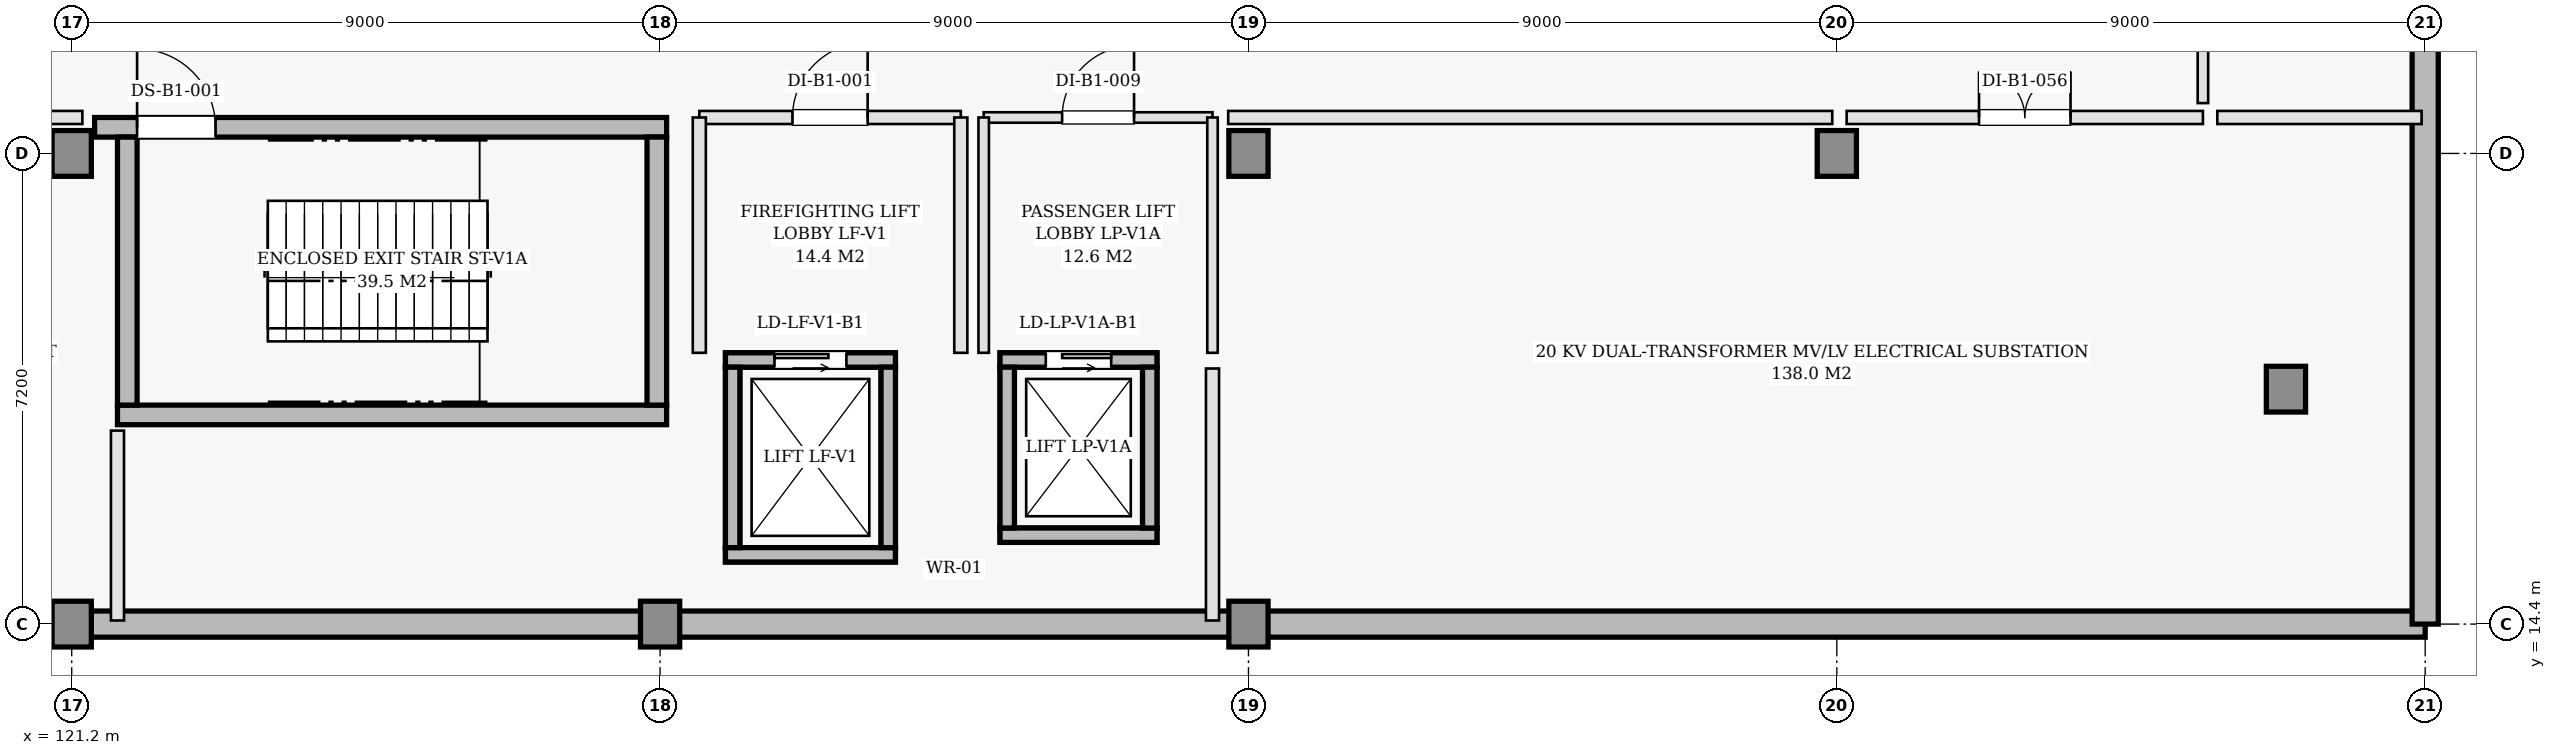
"""IFC4 building model, lengths in metres.
Left out: names, types, materials, properties, quantities, classifications, styles, units other than length and angle.
Written with IfcOpenShell. Run it as: python <this file> out.ifc"""

import sys

from ifc_helpers import new_model, si_unit, direction, frame, frame_2d, origin, origin_2d, place, context, subcontext, project, spatial, rectangle, extrude, element, fill, save


model = new_model("IFC4")
c1 = context("Model", 3, precision=1e-05, world=origin(), true_north=direction((0.0, 1.0)))
c2 = subcontext(c1, "Body", "Model", "MODEL_VIEW")
j1 = project(units=[si_unit("LENGTHUNIT", "METRE"), si_unit("PLANEANGLEUNIT", "RADIAN")], contexts=[c1])
p1 = place(None, origin())
s1 = spatial("IfcSite", under=j1, at=p1, CompositionType="ELEMENT")
p2 = place(p1, origin())
s2 = spatial("IfcBuilding", under=s1, at=p2, CompositionType="ELEMENT")
p3 = place(p2, frame((0.0, 0.0, -4.5)))
s3 = spatial("IfcBuildingStorey", under=s2, at=p3, CompositionType="ELEMENT", Elevation=-4.5)
for number, where, z_axis, x_axis in (
    (1, (121.2, 14.4, 0.0), (0.0, 0.0, 1.0), (1.0, 0.0, 0.0)),
    (2, (121.2, 21.6, 0.0), (0.0, 0.0, 1.0), (1.0, 0.0, 0.0)),
    (3, (130.2, 14.4, 0.0), (0.0, 0.0, 1.0), (1.0, 0.0, 0.0)),
    (4, (139.2, 14.4, 0.0), (0.0, 0.0, 1.0), (1.0, 0.0, 0.0)),
    (5, (139.2, 21.6, 0.0), (0.0, 0.0, 1.0), (1.0, 0.0, 0.0)),
    (6, (148.2, 21.6, 0.0), (0.0, 0.0, 1.0), (1.0, 0.0, 0.0)),
):
    element("IfcColumn", number, at=place(p3, frame(where, z_axis=z_axis, x_axis=x_axis)), inside=s3, PredefinedType="COLUMN", context=c2, shape_type="SweptSolid", body=[
        extrude(rectangle(XDim=0.7, YDim=0.7, at=origin_2d()), origin(), (0.0, 0.0, 1.0), 4.5),
    ])
p4 = place(p3, frame((155.07, 17.994, 0.0), z_axis=(0.0, 0.0, 1.0), x_axis=(1.0, 0.0, 0.0)))
e7 = element("IfcColumn", 7, at=p4, inside=s3, PredefinedType="PILASTER", context=c2, shape_type="SweptSolid", body=[
    extrude(rectangle(XDim=0.7, YDim=0.7, at=origin_2d()), origin(), (0.0, 0.0, 1.0), 4.5),
])
p5 = place(p3, frame((112.2, 14.4, 0.0), z_axis=(0.0, 0.0, 1.0), x_axis=(1.0, 0.0, 0.0)))
e8 = element("IfcWall", 8, at=p5, inside=s3, PredefinedType="USERDEFINED", context=c2, shape_type="SweptSolid", body=[
    extrude(rectangle(XDim=45.0, YDim=0.4, at=frame_2d((22.5, 0.0))), origin(), (0.0, 0.0, 1.0), 4.15),
])
p6 = place(p3, frame((157.2, 14.4, 0.0), z_axis=(0.0, 0.0, 1.0), x_axis=(0.0, 1.0, 0.0)))
e9 = element("IfcWall", 9, at=p6, inside=s3, PredefinedType="USERDEFINED", context=c2, shape_type="SweptSolid", body=[
    extrude(rectangle(XDim=21.6, YDim=0.4, at=frame_2d((10.8, 0.0))), origin(), (0.0, 0.0, 1.0), 4.15),
])
p7 = place(p3, frame((121.9, 17.6, 0.0), z_axis=(0.0, 0.0, 1.0), x_axis=(1.0, 0.0, 0.0)))
e10 = element("IfcWall", 10, at=p7, inside=s3, PredefinedType="SHEAR", context=c2, shape_type="SweptSolid", body=[
    extrude(rectangle(XDim=8.4, YDim=0.3, at=frame_2d((4.2, 0.0))), origin(), (0.0, 0.0, 1.0), 4.15),
])
p8 = place(p3, frame((121.55, 22.0, 0.0), z_axis=(0.0, 0.0, 1.0), x_axis=(1.0, 0.0, 0.0)))
e11 = element("IfcWall", 11, at=p8, inside=s3, PredefinedType="SHEAR", context=c2, shape_type="SweptSolid", body=[
    extrude(rectangle(XDim=8.75, YDim=0.3, at=frame_2d((4.375, 0.0))), origin(), (0.0, 0.0, 1.0), 4.15),
])
p9 = place(p8, frame((0.65, 0.0, 0.0)))
e12 = element("IfcOpeningElement", 12, at=p9, cuts=e11, PredefinedType="OPENING", context=c2, shape_type="SweptSolid", body=[
    extrude(rectangle(XDim=1.2, YDim=2.15, at=frame_2d((0.6, 1.075))), frame((0.0, 0.16, 0.0), z_axis=(0.0, -1.0, 0.0), x_axis=(1.0, 0.0, 0.0)), (0.0, 0.0, 1.0), 0.32),
])
for number, where, z_axis, x_axis in (
    (13, (122.05, 17.75, 0.0), (0.0, 0.0, 1.0), (0.0, 1.0, 0.0)),
    (14, (130.15, 17.75, 0.0), (0.0, 0.0, 1.0), (0.0, 1.0, 0.0)),
):
    element("IfcWall", number, at=place(p3, frame(where, z_axis=z_axis, x_axis=x_axis)), inside=s3, PredefinedType="SHEAR", context=c2, shape_type="SweptSolid", body=[
        extrude(rectangle(XDim=4.1, YDim=0.3, at=frame_2d((2.05, 0.0))), origin(), (0.0, 0.0, 1.0), 4.15),
    ])
for number, where, z_axis, x_axis in (
    (15, (131.2, 15.46, -1.4), (0.0, 0.0, 1.0), (1.0, 0.0, 0.0)),
    (16, (131.2, 18.44, -1.4), (0.0, 0.0, 1.0), (1.0, 0.0, 0.0)),
):
    element("IfcWall", number, at=place(p3, frame(where, z_axis=z_axis, x_axis=x_axis)), inside=s3, PredefinedType="SHEAR", context=c2, shape_type="SweptSolid", body=[
        extrude(rectangle(XDim=2.6, YDim=0.22, at=frame_2d((1.3, 0.0))), origin(), (0.0, 0.0, 1.0), 0.9),
    ])
for number, where, z_axis, x_axis in (
    (17, (131.31, 15.57, -1.4), (0.0, 0.0, 1.0), (0.0, 1.0, 0.0)),
    (18, (133.69, 15.57, -1.4), (0.0, 0.0, 1.0), (0.0, 1.0, 0.0)),
):
    element("IfcWall", number, at=place(p3, frame(where, z_axis=z_axis, x_axis=x_axis)), inside=s3, PredefinedType="SHEAR", context=c2, shape_type="SweptSolid", body=[
        extrude(rectangle(XDim=2.76, YDim=0.22, at=frame_2d((1.38, 0.0))), origin(), (0.0, 0.0, 1.0), 0.9),
    ])
p10 = place(p3, frame((131.2, 15.46, 0.0), z_axis=(0.0, 0.0, 1.0), x_axis=(1.0, 0.0, 0.0)))
e19 = element("IfcWall", 19, at=p10, inside=s3, PredefinedType="SHEAR", context=c2, shape_type="SweptSolid", body=[
    extrude(rectangle(XDim=2.6, YDim=0.22, at=frame_2d((1.3, 0.0))), origin(), (0.0, 0.0, 1.0), 4.15),
])
p11 = place(p3, frame((131.2, 18.44, 0.0), z_axis=(0.0, 0.0, 1.0), x_axis=(1.0, 0.0, 0.0)))
e20 = element("IfcWall", 20, at=p11, inside=s3, PredefinedType="SHEAR", context=c2, shape_type="SweptSolid", body=[
    extrude(rectangle(XDim=2.6, YDim=0.22, at=frame_2d((1.3, 0.0))), origin(), (0.0, 0.0, 1.0), 4.15),
])
p12 = place(p11, frame((0.75, 0.0, 0.0)))
e21 = element("IfcOpeningElement", 21, at=p12, cuts=e20, PredefinedType="OPENING", context=c2, shape_type="SweptSolid", body=[
    extrude(rectangle(XDim=1.1, YDim=2.15, at=frame_2d((0.55, 1.075))), frame((0.0, 0.12, 0.0), z_axis=(0.0, -1.0, 0.0), x_axis=(1.0, 0.0, 0.0)), (0.0, 0.0, 1.0), 0.24),
])
for number, where, z_axis, x_axis in (
    (22, (131.31, 15.57, 0.0), (0.0, 0.0, 1.0), (0.0, 1.0, 0.0)),
    (23, (133.69, 15.57, 0.0), (0.0, 0.0, 1.0), (0.0, 1.0, 0.0)),
):
    element("IfcWall", number, at=place(p3, frame(where, z_axis=z_axis, x_axis=x_axis)), inside=s3, PredefinedType="SHEAR", context=c2, shape_type="SweptSolid", body=[
        extrude(rectangle(XDim=2.76, YDim=0.22, at=frame_2d((1.38, 0.0))), origin(), (0.0, 0.0, 1.0), 4.15),
    ])
p13 = place(p3, frame((130.8, 22.15, 0.0), z_axis=(0.0, 0.0, 1.0), x_axis=(1.0, 0.0, 0.0)))
e24 = element("IfcWall", 24, at=p13, inside=s3, PredefinedType="PARTITIONING", context=c2, shape_type="SweptSolid", body=[
    extrude(rectangle(XDim=4.0, YDim=0.2, at=frame_2d((2.0, 0.0))), origin(), (0.0, 0.0, 1.0), 4.15),
])
p14 = place(p13, frame((1.425, 0.0, 0.0)))
e25 = element("IfcOpeningElement", 25, at=p14, cuts=e24, PredefinedType="OPENING", context=c2, shape_type="SweptSolid", body=[
    extrude(rectangle(XDim=1.15, YDim=2.15, at=frame_2d((0.575, 1.075))), frame((0.0, 0.11, 0.0), z_axis=(0.0, -1.0, 0.0), x_axis=(1.0, 0.0, 0.0)), (0.0, 0.0, 1.0), 0.22),
])
for number, where, z_axis, x_axis in (
    (26, (130.8, 18.55, 0.0), (0.0, 0.0, 1.0), (0.0, 1.0, 0.0)),
    (27, (134.8, 18.55, 0.0), (0.0, 0.0, 1.0), (0.0, 1.0, 0.0)),
):
    element("IfcWall", number, at=place(p3, frame(where, z_axis=z_axis, x_axis=x_axis)), inside=s3, PredefinedType="PARTITIONING", context=c2, shape_type="SweptSolid", body=[
        extrude(rectangle(XDim=3.6, YDim=0.2, at=frame_2d((1.8, 0.0))), origin(), (0.0, 0.0, 1.0), 4.15),
    ])
for number, where, z_axis, x_axis in (
    (28, (135.4, 15.76, -1.4), (0.0, 0.0, 1.0), (1.0, 0.0, 0.0)),
    (29, (135.4, 18.44, -1.4), (0.0, 0.0, 1.0), (1.0, 0.0, 0.0)),
):
    element("IfcWall", number, at=place(p3, frame(where, z_axis=z_axis, x_axis=x_axis)), inside=s3, PredefinedType="SHEAR", context=c2, shape_type="SweptSolid", body=[
        extrude(rectangle(XDim=2.4, YDim=0.22, at=frame_2d((1.2, 0.0))), origin(), (0.0, 0.0, 1.0), 0.9),
    ])
for number, where, z_axis, x_axis in (
    (30, (135.51, 15.87, -1.4), (0.0, 0.0, 1.0), (0.0, 1.0, 0.0)),
    (31, (137.69, 15.87, -1.4), (0.0, 0.0, 1.0), (0.0, 1.0, 0.0)),
):
    element("IfcWall", number, at=place(p3, frame(where, z_axis=z_axis, x_axis=x_axis)), inside=s3, PredefinedType="SHEAR", context=c2, shape_type="SweptSolid", body=[
        extrude(rectangle(XDim=2.46, YDim=0.22, at=frame_2d((1.23, 0.0))), origin(), (0.0, 0.0, 1.0), 0.9),
    ])
p15 = place(p3, frame((135.4, 15.76, 0.0), z_axis=(0.0, 0.0, 1.0), x_axis=(1.0, 0.0, 0.0)))
e32 = element("IfcWall", 32, at=p15, inside=s3, PredefinedType="SHEAR", context=c2, shape_type="SweptSolid", body=[
    extrude(rectangle(XDim=2.4, YDim=0.22, at=frame_2d((1.2, 0.0))), origin(), (0.0, 0.0, 1.0), 4.15),
])
p16 = place(p3, frame((135.4, 18.44, 0.0), z_axis=(0.0, 0.0, 1.0), x_axis=(1.0, 0.0, 0.0)))
e33 = element("IfcWall", 33, at=p16, inside=s3, PredefinedType="SHEAR", context=c2, shape_type="SweptSolid", body=[
    extrude(rectangle(XDim=2.4, YDim=0.22, at=frame_2d((1.2, 0.0))), origin(), (0.0, 0.0, 1.0), 4.15),
])
p17 = place(p16, frame((0.7, 0.0, 0.0)))
e34 = element("IfcOpeningElement", 34, at=p17, cuts=e33, PredefinedType="OPENING", context=c2, shape_type="SweptSolid", body=[
    extrude(rectangle(XDim=1.0, YDim=2.15, at=frame_2d((0.5, 1.075))), frame((0.0, 0.12, 0.0), z_axis=(0.0, -1.0, 0.0), x_axis=(1.0, 0.0, 0.0)), (0.0, 0.0, 1.0), 0.24),
])
for number, where, z_axis, x_axis in (
    (35, (135.51, 15.87, 0.0), (0.0, 0.0, 1.0), (0.0, 1.0, 0.0)),
    (36, (137.69, 15.87, 0.0), (0.0, 0.0, 1.0), (0.0, 1.0, 0.0)),
):
    element("IfcWall", number, at=place(p3, frame(where, z_axis=z_axis, x_axis=x_axis)), inside=s3, PredefinedType="SHEAR", context=c2, shape_type="SweptSolid", body=[
        extrude(rectangle(XDim=2.46, YDim=0.22, at=frame_2d((1.23, 0.0))), origin(), (0.0, 0.0, 1.0), 4.15),
    ])
p18 = place(p3, frame((135.15, 22.15, 0.0), z_axis=(0.0, 0.0, 1.0), x_axis=(1.0, 0.0, 0.0)))
e37 = element("IfcWall", 37, at=p18, inside=s3, PredefinedType="PARTITIONING", context=c2, shape_type="SweptSolid", body=[
    extrude(rectangle(XDim=3.5, YDim=0.16, at=frame_2d((1.75, 0.0))), origin(), (0.0, 0.0, 1.0), 4.15),
])
p19 = place(p18, frame((1.2, 0.0, 0.0)))
e38 = element("IfcOpeningElement", 38, at=p19, cuts=e37, PredefinedType="OPENING", context=c2, shape_type="SweptSolid", body=[
    extrude(rectangle(XDim=1.1, YDim=2.15, at=frame_2d((0.55, 1.075))), frame((0.0, 0.09, 0.0), z_axis=(0.0, -1.0, 0.0), x_axis=(1.0, 0.0, 0.0)), (0.0, 0.0, 1.0), 0.18),
])
for number, where, z_axis, x_axis in (
    (39, (135.15, 18.55, 0.0), (0.0, 0.0, 1.0), (0.0, 1.0, 0.0)),
    (40, (138.65, 18.55, 0.0), (0.0, 0.0, 1.0), (0.0, 1.0, 0.0)),
):
    element("IfcWall", number, at=place(p3, frame(where, z_axis=z_axis, x_axis=x_axis)), inside=s3, PredefinedType="PARTITIONING", context=c2, shape_type="SweptSolid", body=[
        extrude(rectangle(XDim=3.6, YDim=0.16, at=frame_2d((1.8, 0.0))), origin(), (0.0, 0.0, 1.0), 4.15),
    ])
p20 = place(p3, frame((112.255, 22.15, 0.0), z_axis=(0.0, 0.0, 1.0), x_axis=(1.0, 0.0, 0.0)))
e41 = element("IfcWall", 41, at=p20, inside=s3, PredefinedType="PARTITIONING", context=c2, shape_type="SweptSolid", body=[
    extrude(rectangle(XDim=9.108, YDim=0.2, at=frame_2d((4.554, 0.0))), origin(), (0.0, 0.0, 1.0), 3.485),
])
p21 = place(p20, frame((3.854, 0.0, 0.0)))
e42 = element("IfcOpeningElement", 42, at=p21, cuts=e41, PredefinedType="OPENING", context=c2, shape_type="SweptSolid", body=[
    extrude(rectangle(XDim=1.4, YDim=2.15, at=frame_2d((0.7, 1.075))), frame((0.0, 0.11, 0.0), z_axis=(0.0, -1.0, 0.0), x_axis=(1.0, 0.0, 0.0)), (0.0, 0.0, 1.0), 0.22),
])
p22 = place(p3, frame((121.9, 14.455, 0.0), z_axis=(0.0, 0.0, 1.0), x_axis=(0.0, 1.0, 0.0)))
e43 = element("IfcWall", 43, at=p22, inside=s3, PredefinedType="PARTITIONING", context=c2, shape_type="SweptSolid", body=[
    extrude(rectangle(XDim=2.905, YDim=0.2, at=frame_2d((1.453, 0.0))), origin(), (0.0, 0.0, 1.0), 3.335),
])
p23 = place(p3, frame((148.35, 22.15, 0.0), z_axis=(0.0, 0.0, 1.0), x_axis=(1.0, 0.0, 0.0)))
e44 = element("IfcWall", 44, at=p23, inside=s3, PredefinedType="PARTITIONING", context=c2, shape_type="SweptSolid", body=[
    extrude(rectangle(XDim=5.45, YDim=0.2, at=frame_2d((2.725, 0.0))), origin(), (0.0, 0.0, 1.0), 3.485),
])
p24 = place(p23, frame((2.025, 0.0, 0.0)))
e45 = element("IfcOpeningElement", 45, at=p24, cuts=e44, PredefinedType="OPENING", context=c2, shape_type="SweptSolid", body=[
    extrude(rectangle(XDim=1.4, YDim=2.15, at=frame_2d((0.7, 1.075))), frame((0.0, 0.11, 0.0), z_axis=(0.0, -1.0, 0.0), x_axis=(1.0, 0.0, 0.0)), (0.0, 0.0, 1.0), 0.22),
])
p25 = place(p3, frame((138.89, 22.15, 0.0), z_axis=(0.0, 0.0, 1.0), x_axis=(1.0, 0.0, 0.0)))
e46 = element("IfcWall", 46, at=p25, inside=s3, PredefinedType="PARTITIONING", context=c2, shape_type="SweptSolid", body=[
    extrude(rectangle(XDim=9.24, YDim=0.2, at=frame_2d((4.62, 0.0))), origin(), (0.0, 0.0, 1.0), 3.485),
])
p26 = place(p3, frame((154.02, 22.15, 0.0), z_axis=(0.0, 0.0, 1.0), x_axis=(1.0, 0.0, 0.0)))
e47 = element("IfcWall", 47, at=p26, inside=s3, PredefinedType="PARTITIONING", context=c2, shape_type="SweptSolid", body=[
    extrude(rectangle(XDim=3.125, YDim=0.2, at=frame_2d((1.562, 0.0))), origin(), (0.0, 0.0, 1.0), 4.15),
])
p27 = place(p3, frame((138.65, 14.455, 0.0), z_axis=(0.0, 0.0, 1.0), x_axis=(0.0, 1.0, 0.0)))
e48 = element("IfcWall", 48, at=p27, inside=s3, PredefinedType="PARTITIONING", context=c2, shape_type="SweptSolid", body=[
    extrude(rectangle(XDim=3.855, YDim=0.2, at=frame_2d((1.927, 0.0))), origin(), (0.0, 0.0, 1.0), 3.335),
])
p28 = place(p3, frame((153.8, 22.37, 0.0), z_axis=(0.0, 0.0, 1.0), x_axis=(0.0, 1.0, 0.0)))
e49 = element("IfcWall", 49, at=p28, inside=s3, PredefinedType="PARTITIONING", context=c2, shape_type="SweptSolid", body=[
    extrude(rectangle(XDim=2.48, YDim=0.16, at=frame_2d((1.24, 0.0))), origin(), (0.0, 0.0, 1.0), 4.15),
])
p29 = place(p9, origin())
e50 = element("IfcDoor", 50, at=p29, inside=s3, OperationType="SINGLE_SWING_LEFT", PredefinedType="DOOR", context=c2, shape_type="SweptSolid", body=[
    extrude(rectangle(XDim=1.2, YDim=2.15, at=frame_2d((0.6, 1.075))), frame((0.0, 0.025, 0.0), z_axis=(0.0, -1.0, 0.0), x_axis=(1.0, 0.0, 0.0)), (0.0, 0.0, 1.0), 0.05),
])
fill(e12, e50)
p30 = place(p12, origin())
e51 = element("IfcDoor", 51, at=p30, inside=s3, OperationType="SLIDING_TO_LEFT", PredefinedType="DOOR", context=c2, shape_type="SweptSolid", body=[
    extrude(rectangle(XDim=1.1, YDim=2.15, at=frame_2d((0.55, 1.075))), frame((0.0, 0.025, 0.0), z_axis=(0.0, -1.0, 0.0), x_axis=(1.0, 0.0, 0.0)), (0.0, 0.0, 1.0), 0.05),
])
fill(e21, e51)
p31 = place(p14, origin())
e52 = element("IfcDoor", 52, at=p31, inside=s3, OperationType="SINGLE_SWING_RIGHT", PredefinedType="DOOR", context=c2, shape_type="SweptSolid", body=[
    extrude(rectangle(XDim=1.15, YDim=2.15, at=frame_2d((0.575, 1.075))), frame((0.0, 0.025, 0.0), z_axis=(0.0, -1.0, 0.0), x_axis=(1.0, 0.0, 0.0)), (0.0, 0.0, 1.0), 0.05),
])
fill(e25, e52)
p32 = place(p17, origin())
e53 = element("IfcDoor", 53, at=p32, inside=s3, OperationType="SLIDING_TO_RIGHT", PredefinedType="DOOR", context=c2, shape_type="SweptSolid", body=[
    extrude(rectangle(XDim=1.0, YDim=2.15, at=frame_2d((0.5, 1.075))), frame((0.0, 0.025, 0.0), z_axis=(0.0, -1.0, 0.0), x_axis=(1.0, 0.0, 0.0)), (0.0, 0.0, 1.0), 0.05),
])
fill(e34, e53)
p33 = place(p19, origin())
e54 = element("IfcDoor", 54, at=p33, inside=s3, OperationType="SINGLE_SWING_RIGHT", PredefinedType="DOOR", context=c2, shape_type="SweptSolid", body=[
    extrude(rectangle(XDim=1.1, YDim=2.15, at=frame_2d((0.55, 1.075))), frame((0.0, 0.025, 0.0), z_axis=(0.0, -1.0, 0.0), x_axis=(1.0, 0.0, 0.0)), (0.0, 0.0, 1.0), 0.05),
])
fill(e38, e54)
p34 = place(p24, origin())
e55 = element("IfcDoor", 55, at=p34, inside=s3, OperationType="DOUBLE_DOOR_SINGLE_SWING", PredefinedType="DOOR", context=c2, shape_type="SweptSolid", body=[
    extrude(rectangle(XDim=1.4, YDim=2.15, at=frame_2d((0.7, 1.075))), frame((0.0, 0.025, 0.0), z_axis=(0.0, -1.0, 0.0), x_axis=(1.0, 0.0, 0.0)), (0.0, 0.0, 1.0), 0.05),
])
fill(e45, e55)
save(model, sys.argv[1])
